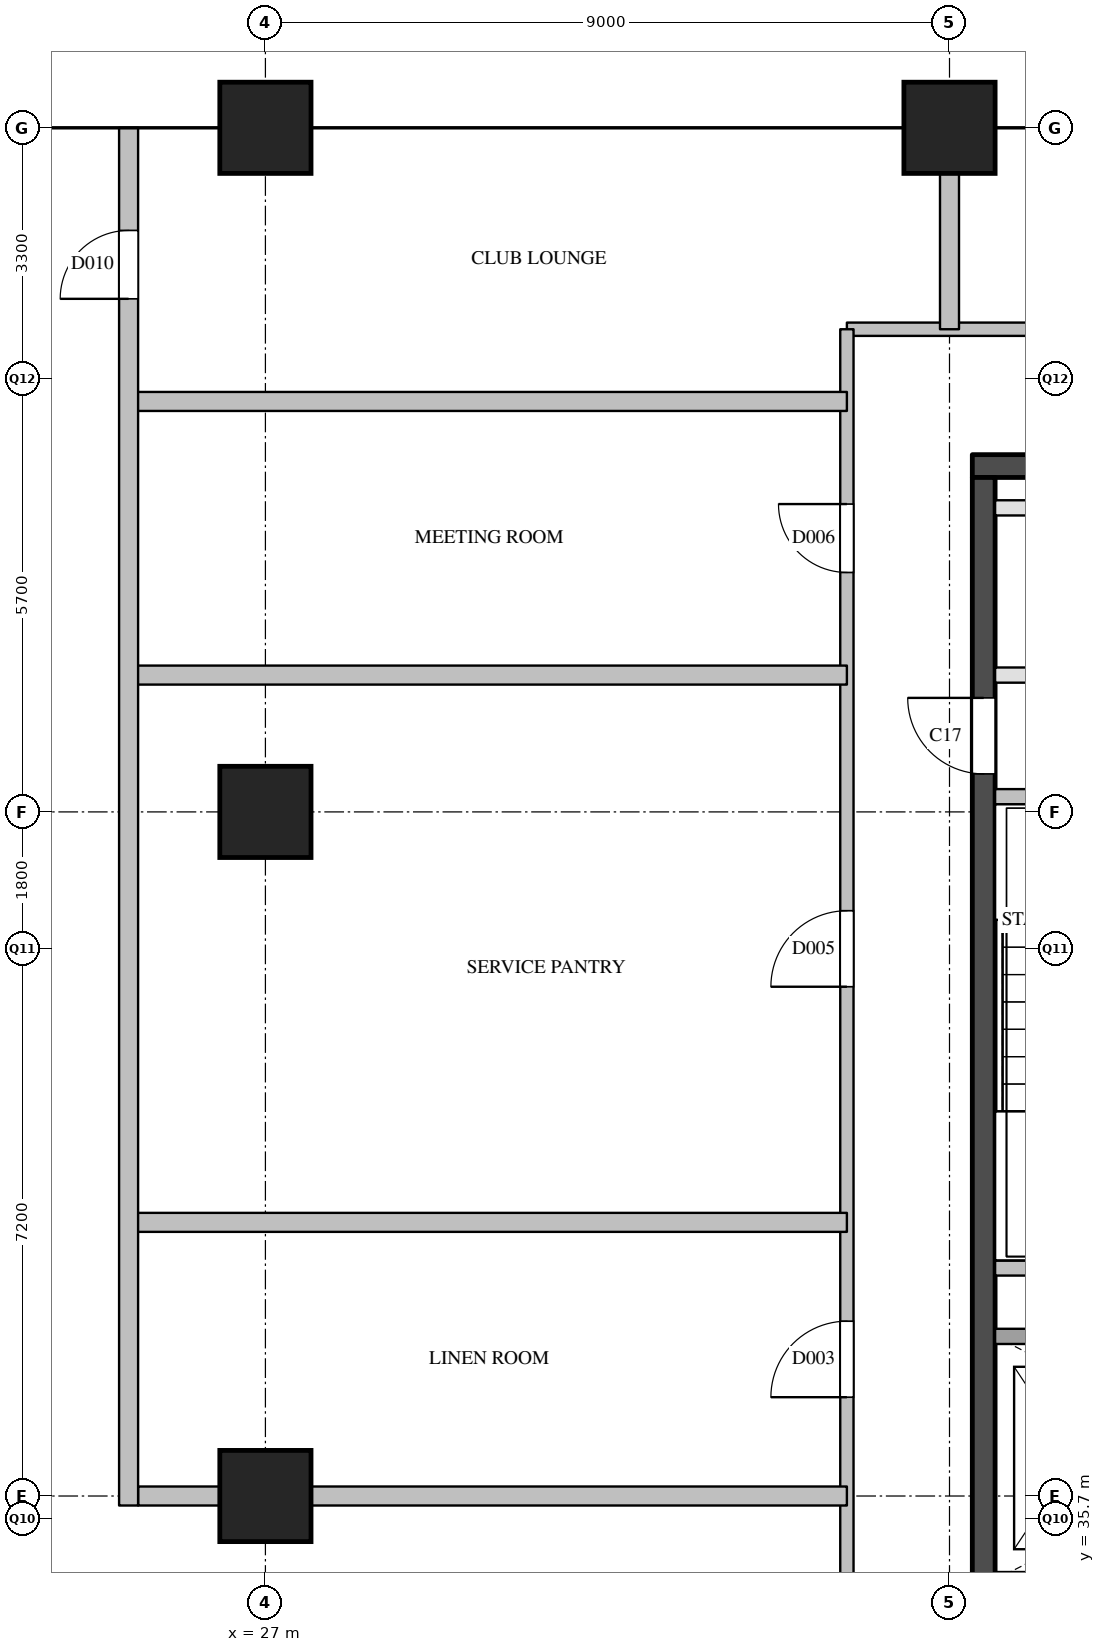
"""IFC4 building model, lengths in metres.
Left out: names, types, materials, properties, quantities, classifications, styles, units other than length and angle.
Written with IfcOpenShell. Run it as: python <this file> out.ifc"""

import sys

from ifc_helpers import new_model, si_unit, direction, frame, frame_2d, origin, origin_2d, place, context, subcontext, project, spatial, rectangle, extrude, element, fill, save


model = new_model("IFC4")
c1 = context("Model", 3, precision=1e-05, world=origin(), true_north=direction((0.0, 1.0)))
c2 = subcontext(c1, "Body", "Model", "MODEL_VIEW")
j1 = project(units=[si_unit("LENGTHUNIT", "METRE"), si_unit("PLANEANGLEUNIT", "RADIAN")], contexts=[c1])
p1 = place(None, origin())
s1 = spatial("IfcSite", under=j1, at=p1, CompositionType="ELEMENT")
p2 = place(p1, origin())
s2 = spatial("IfcBuilding", under=s1, at=p2, CompositionType="ELEMENT")
p3 = place(p2, frame((0.0, 0.0, 290.2)))
s3 = spatial("IfcBuildingStorey", under=s2, at=p3, CompositionType="ELEMENT", Elevation=290.2)
for number, where, z_axis, x_axis in (
    (1, (27.0, 36.0, 0.0), (0.0, 0.0, 1.0), (1.0, 0.0, 0.0)),
    (2, (27.0, 45.0, 0.0), (0.0, 0.0, 1.0), (1.0, 0.0, 0.0)),
    (3, (27.0, 54.0, 0.0), (0.0, 0.0, 1.0), (1.0, 0.0, 0.0)),
    (4, (36.0, 54.0, 0.0), (0.0, 0.0, 1.0), (1.0, 0.0, 0.0)),
):
    element("IfcColumn", number, at=place(p3, frame(where, z_axis=z_axis, x_axis=x_axis)), inside=s3, PredefinedType="COLUMN", context=c2, shape_type="SweptSolid", body=[
        extrude(rectangle(XDim=1.2, YDim=1.2, at=origin_2d()), origin(), (0.0, 0.0, 1.0), 5.0),
    ])
p4 = place(p3, frame((36.3, 49.55, 0.0), z_axis=(0.0, 0.0, 1.0), x_axis=(1.0, 0.0, 0.0)))
e5 = element("IfcWall", 5, at=p4, inside=s3, PredefinedType="SHEAR", context=c2, shape_type="SweptSolid", body=[
    extrude(rectangle(XDim=11.8, YDim=0.3, at=frame_2d((5.9, 0.0))), origin(), (0.0, 0.0, 1.0), 4.5),
])
p5 = place(p3, frame((36.45, 29.1, 0.0), z_axis=(0.0, 0.0, 1.0), x_axis=(0.0, 1.0, 0.0)))
e6 = element("IfcWall", 6, at=p5, inside=s3, PredefinedType="SHEAR", context=c2, shape_type="SweptSolid", body=[
    extrude(rectangle(XDim=20.3, YDim=0.3, at=frame_2d((10.15, 0.0))), origin(), (0.0, 0.0, 1.0), 4.5),
])
p6 = place(p5, frame((3.6, 0.0, 0.0)))
e7 = element("IfcOpeningElement", 7, at=p6, cuts=e6, PredefinedType="OPENING", context=c2, shape_type="SweptSolid", body=[
    extrude(rectangle(XDim=1.8, YDim=2.1, at=frame_2d((0.9, 1.05))), frame((0.0, 0.16, 0.0), z_axis=(0.0, -1.0, 0.0), x_axis=(1.0, 0.0, 0.0)), (0.0, 0.0, 1.0), 0.32),
])
p7 = place(p5, frame((16.4, 0.0, 0.0)))
e8 = element("IfcOpeningElement", 8, at=p7, cuts=e6, PredefinedType="OPENING", context=c2, shape_type="SweptSolid", body=[
    extrude(rectangle(XDim=1.0, YDim=2.1, at=frame_2d((0.5, 1.05))), frame((0.0, 0.16, 0.0), z_axis=(0.0, -1.0, 0.0), x_axis=(1.0, 0.0, 0.0)), (0.0, 0.0, 1.0), 0.32),
])
p8 = place(p3, frame((36.6, 38.1, 0.0), z_axis=(0.0, 0.0, 1.0), x_axis=(1.0, 0.0, 0.0)))
e9 = element("IfcWall", 9, at=p8, inside=s3, PredefinedType="SOLIDWALL", context=c2, shape_type="SweptSolid", body=[
    extrude(rectangle(XDim=6.7, YDim=0.2, at=frame_2d((3.35, 0.0))), origin(), (0.0, 0.0, 1.0), 4.5),
])
p9 = place(p8, frame((0.45, 0.0, 0.0)))
e10 = element("IfcOpeningElement", 10, at=p9, cuts=e9, PredefinedType="OPENING", context=c2, shape_type="SweptSolid", body=[
    extrude(rectangle(XDim=1.2, YDim=2.1, at=frame_2d((0.6, 1.05))), frame((0.0, 0.11, 0.0), z_axis=(0.0, -1.0, 0.0), x_axis=(1.0, 0.0, 0.0)), (0.0, 0.0, 1.0), 0.22),
])
p10 = place(p8, frame((2.55, 0.0, 0.0)))
e11 = element("IfcOpeningElement", 11, at=p10, cuts=e9, PredefinedType="OPENING", context=c2, shape_type="SweptSolid", body=[
    extrude(rectangle(XDim=1.2, YDim=2.1, at=frame_2d((0.6, 1.05))), frame((0.0, 0.11, 0.0), z_axis=(0.0, -1.0, 0.0), x_axis=(1.0, 0.0, 0.0)), (0.0, 0.0, 1.0), 0.22),
])
p11 = place(p8, frame((4.65, 0.0, 0.0)))
e12 = element("IfcOpeningElement", 12, at=p11, cuts=e9, PredefinedType="OPENING", context=c2, shape_type="SweptSolid", body=[
    extrude(rectangle(XDim=1.2, YDim=2.1, at=frame_2d((0.6, 1.05))), frame((0.0, 0.11, 0.0), z_axis=(0.0, -1.0, 0.0), x_axis=(1.0, 0.0, 0.0)), (0.0, 0.0, 1.0), 0.22),
])
p12 = place(p3, frame((36.6, 39.0, 0.0), z_axis=(0.0, 0.0, 1.0), x_axis=(1.0, 0.0, 0.0)))
e13 = element("IfcWall", 13, at=p12, inside=s3, PredefinedType="SOLIDWALL", context=c2, shape_type="SweptSolid", body=[
    extrude(rectangle(XDim=3.25, YDim=0.2, at=frame_2d((1.625, 0.0))), origin(), (0.0, 0.0, 1.0), 4.5),
])
p13 = place(p3, frame((36.6, 45.2, 0.0), z_axis=(0.0, 0.0, 1.0), x_axis=(1.0, 0.0, 0.0)))
e14 = element("IfcWall", 14, at=p13, inside=s3, PredefinedType="SOLIDWALL", context=c2, shape_type="SweptSolid", body=[
    extrude(rectangle(XDim=3.25, YDim=0.2, at=frame_2d((1.625, 0.0))), origin(), (0.0, 0.0, 1.0), 4.5),
])
p14 = place(p13, frame((1.125, 0.0, 0.0)))
e15 = element("IfcOpeningElement", 15, at=p14, cuts=e14, PredefinedType="OPENING", context=c2, shape_type="SweptSolid", body=[
    extrude(rectangle(XDim=1.1, YDim=2.1, at=frame_2d((0.55, 1.05))), frame((0.0, 0.11, 0.0), z_axis=(0.0, -1.0, 0.0), x_axis=(1.0, 0.0, 0.0)), (0.0, 0.0, 1.0), 0.22),
])
p15 = place(p3, frame((36.6, 46.8, 0.0), z_axis=(0.0, 0.0, 1.0), x_axis=(1.0, 0.0, 0.0)))
e16 = element("IfcWall", 16, at=p15, inside=s3, PredefinedType="PARTITIONING", context=c2, shape_type="SweptSolid", body=[
    extrude(rectangle(XDim=11.2, YDim=0.2, at=frame_2d((5.6, 0.0))), origin(), (0.0, 0.0, 1.0), 4.5),
])
p16 = place(p15, frame((3.75, 0.0, 0.0)))
e17 = element("IfcOpeningElement", 17, at=p16, cuts=e16, PredefinedType="OPENING", context=c2, shape_type="SweptSolid", body=[
    extrude(rectangle(XDim=0.9, YDim=2.1, at=frame_2d((0.45, 1.05))), frame((0.0, 0.11, 0.0), z_axis=(0.0, -1.0, 0.0), x_axis=(1.0, 0.0, 0.0)), (0.0, 0.0, 1.0), 0.22),
])
p17 = place(p15, frame((9.35, 0.0, 0.0)))
e18 = element("IfcOpeningElement", 18, at=p17, cuts=e16, PredefinedType="OPENING", context=c2, shape_type="SweptSolid", body=[
    extrude(rectangle(XDim=0.9, YDim=2.1, at=frame_2d((0.45, 1.05))), frame((0.0, 0.11, 0.0), z_axis=(0.0, -1.0, 0.0), x_axis=(1.0, 0.0, 0.0)), (0.0, 0.0, 1.0), 0.22),
])
p18 = place(p3, frame((36.6, 49.0, 0.0), z_axis=(0.0, 0.0, 1.0), x_axis=(1.0, 0.0, 0.0)))
e19 = element("IfcWall", 19, at=p18, inside=s3, PredefinedType="PARTITIONING", context=c2, shape_type="SweptSolid", body=[
    extrude(rectangle(XDim=11.2, YDim=0.2, at=frame_2d((5.6, 0.0))), origin(), (0.0, 0.0, 1.0), 4.5),
])
p19 = place(p3, frame((34.65, 51.35, 0.0), z_axis=(0.0, 0.0, 1.0), x_axis=(1.0, 0.0, 0.0)))
e20 = element("IfcWall", 20, at=p19, inside=s3, PredefinedType="PARTITIONING", context=c2, shape_type="SweptSolid", body=[
    extrude(rectangle(XDim=15.1, YDim=0.175, at=frame_2d((7.55, 0.0))), origin(), (0.0, 0.0, 1.0), 4.5),
])
p20 = place(p19, frame((4.45, 0.0, 0.0)))
e21 = element("IfcOpeningElement", 21, at=p20, cuts=e20, PredefinedType="OPENING", context=c2, shape_type="SweptSolid", body=[
    extrude(rectangle(XDim=1.0, YDim=2.1, at=frame_2d((0.5, 1.05))), frame((0.0, 0.097, 0.0), z_axis=(0.0, -1.0, 0.0), x_axis=(1.0, 0.0, 0.0)), (0.0, 0.0, 1.0), 0.195),
])
p21 = place(p19, frame((11.294, 0.0, 0.0)))
e22 = element("IfcOpeningElement", 22, at=p21, cuts=e20, PredefinedType="OPENING", context=c2, shape_type="SweptSolid", body=[
    extrude(rectangle(XDim=0.9, YDim=2.1, at=frame_2d((0.45, 1.05))), frame((0.0, 0.097, 0.0), z_axis=(0.0, -1.0, 0.0), x_axis=(1.0, 0.0, 0.0)), (0.0, 0.0, 1.0), 0.195),
])
p22 = place(p3, frame((34.65, 28.5, 0.0), z_axis=(0.0, 0.0, 1.0), x_axis=(0.0, 1.0, 0.0)))
e23 = element("IfcWall", 23, at=p22, inside=s3, PredefinedType="PARTITIONING", context=c2, shape_type="SweptSolid", body=[
    extrude(rectangle(XDim=22.85, YDim=0.175, at=frame_2d((11.425, 0.0))), origin(), (0.0, 0.0, 1.0), 4.5),
])
p23 = place(p22, frame((3.3, 0.0, 0.0)))
e24 = element("IfcOpeningElement", 24, at=p23, cuts=e23, PredefinedType="OPENING", context=c2, shape_type="SweptSolid", body=[
    extrude(rectangle(XDim=0.9, YDim=2.1, at=frame_2d((0.45, 1.05))), frame((0.0, 0.097, 0.0), z_axis=(0.0, -1.0, 0.0), x_axis=(1.0, 0.0, 0.0)), (0.0, 0.0, 1.0), 0.195),
])
p24 = place(p22, frame((8.8, 0.0, 0.0)))
e25 = element("IfcOpeningElement", 25, at=p24, cuts=e23, PredefinedType="OPENING", context=c2, shape_type="SweptSolid", body=[
    extrude(rectangle(XDim=1.0, YDim=2.1, at=frame_2d((0.5, 1.05))), frame((0.0, 0.097, 0.0), z_axis=(0.0, -1.0, 0.0), x_axis=(1.0, 0.0, 0.0)), (0.0, 0.0, 1.0), 0.195),
])
p25 = place(p22, frame((14.2, 0.0, 0.0)))
e26 = element("IfcOpeningElement", 26, at=p25, cuts=e23, PredefinedType="OPENING", context=c2, shape_type="SweptSolid", body=[
    extrude(rectangle(XDim=1.0, YDim=2.1, at=frame_2d((0.5, 1.05))), frame((0.0, 0.097, 0.0), z_axis=(0.0, -1.0, 0.0), x_axis=(1.0, 0.0, 0.0)), (0.0, 0.0, 1.0), 0.195),
])
p26 = place(p22, frame((19.65, 0.0, 0.0)))
e27 = element("IfcOpeningElement", 27, at=p26, cuts=e23, PredefinedType="OPENING", context=c2, shape_type="SweptSolid", body=[
    extrude(rectangle(XDim=0.9, YDim=2.1, at=frame_2d((0.45, 1.05))), frame((0.0, 0.097, 0.0), z_axis=(0.0, -1.0, 0.0), x_axis=(1.0, 0.0, 0.0)), (0.0, 0.0, 1.0), 0.195),
])
p27 = place(p3, frame((25.325, 36.0, 0.0), z_axis=(0.0, 0.0, 1.0), x_axis=(1.0, 0.0, 0.0)))
e28 = element("IfcWall", 28, at=p27, inside=s3, PredefinedType="PARTITIONING", context=c2, shape_type="SweptSolid", body=[
    extrude(rectangle(XDim=9.325, YDim=0.25, at=frame_2d((4.663, 0.0))), origin(), (0.0, 0.0, 1.0), 4.5),
])
for number, where, z_axis, x_axis in (
    (29, (25.2, 39.6, 0.0), (0.0, 0.0, 1.0), (1.0, 0.0, 0.0)),
    (30, (25.2, 46.8, 0.0), (0.0, 0.0, 1.0), (1.0, 0.0, 0.0)),
    (31, (25.2, 50.4, 0.0), (0.0, 0.0, 1.0), (1.0, 0.0, 0.0)),
):
    element("IfcWall", number, at=place(p3, frame(where, z_axis=z_axis, x_axis=x_axis)), inside=s3, PredefinedType="PARTITIONING", context=c2, shape_type="SweptSolid", body=[
        extrude(rectangle(XDim=9.45, YDim=0.25, at=frame_2d((4.725, 0.0))), origin(), (0.0, 0.0, 1.0), 3.5),
    ])
p28 = place(p3, frame((25.2, 35.875, 0.0), z_axis=(0.0, 0.0, 1.0), x_axis=(0.0, 1.0, 0.0)))
e32 = element("IfcWall", 32, at=p28, inside=s3, PredefinedType="PARTITIONING", context=c2, shape_type="SweptSolid", body=[
    extrude(rectangle(XDim=18.125, YDim=0.25, at=frame_2d((9.062, 0.0))), origin(), (0.0, 0.0, 1.0), 3.5),
])
p29 = place(p28, frame((15.875, 0.0, 0.0)))
e33 = element("IfcOpeningElement", 33, at=p29, cuts=e32, PredefinedType="OPENING", context=c2, shape_type="SweptSolid", body=[
    extrude(rectangle(XDim=0.9, YDim=2.1, at=frame_2d((0.45, 1.05))), frame((0.0, 0.135, 0.0), z_axis=(0.0, -1.0, 0.0), x_axis=(1.0, 0.0, 0.0)), (0.0, 0.0, 1.0), 0.27),
])
p30 = place(p3, frame((36.0, 51.35, 0.0), z_axis=(0.0, 0.0, 1.0), x_axis=(0.0, 1.0, 0.0)))
e34 = element("IfcWall", 34, at=p30, inside=s3, PredefinedType="PARTITIONING", context=c2, shape_type="SweptSolid", body=[
    extrude(rectangle(XDim=2.65, YDim=0.25, at=frame_2d((1.325, 0.0))), origin(), (0.0, 0.0, 1.0), 4.5),
])
p31 = place(p7, origin())
e35 = element("IfcDoor", 35, at=p31, inside=s3, OperationType="SINGLE_SWING_RIGHT", PredefinedType="DOOR", context=c2, shape_type="SweptSolid", body=[
    extrude(rectangle(XDim=1.0, YDim=2.1, at=frame_2d((0.5, 1.05))), frame((0.0, 0.025, 0.0), z_axis=(0.0, -1.0, 0.0), x_axis=(1.0, 0.0, 0.0)), (0.0, 0.0, 1.0), 0.05),
])
fill(e8, e35)
p32 = place(p24, origin())
e36 = element("IfcDoor", 36, at=p32, inside=s3, OperationType="SINGLE_SWING_LEFT", PredefinedType="DOOR", context=c2, shape_type="SweptSolid", body=[
    extrude(rectangle(XDim=1.0, YDim=2.1, at=frame_2d((0.5, 1.05))), frame((0.0, 0.025, 0.0), z_axis=(0.0, -1.0, 0.0), x_axis=(1.0, 0.0, 0.0)), (0.0, 0.0, 1.0), 0.05),
])
fill(e25, e36)
p33 = place(p25, origin())
e37 = element("IfcDoor", 37, at=p33, inside=s3, OperationType="SINGLE_SWING_LEFT", PredefinedType="DOOR", context=c2, shape_type="SweptSolid", body=[
    extrude(rectangle(XDim=1.0, YDim=2.1, at=frame_2d((0.5, 1.05))), frame((0.0, 0.025, 0.0), z_axis=(0.0, -1.0, 0.0), x_axis=(1.0, 0.0, 0.0)), (0.0, 0.0, 1.0), 0.05),
])
fill(e26, e37)
p34 = place(p26, origin())
e38 = element("IfcDoor", 38, at=p34, inside=s3, OperationType="SINGLE_SWING_RIGHT", PredefinedType="DOOR", context=c2, shape_type="SweptSolid", body=[
    extrude(rectangle(XDim=0.9, YDim=2.1, at=frame_2d((0.45, 1.05))), frame((0.0, 0.025, 0.0), z_axis=(0.0, -1.0, 0.0), x_axis=(1.0, 0.0, 0.0)), (0.0, 0.0, 1.0), 0.05),
])
fill(e27, e38)
p35 = place(p29, origin())
e39 = element("IfcDoor", 39, at=p35, inside=s3, OperationType="SINGLE_SWING_LEFT", PredefinedType="DOOR", context=c2, shape_type="SweptSolid", body=[
    extrude(rectangle(XDim=0.9, YDim=2.1, at=frame_2d((0.45, 1.05))), frame((0.0, 0.025, 0.0), z_axis=(0.0, -1.0, 0.0), x_axis=(1.0, 0.0, 0.0)), (0.0, 0.0, 1.0), 0.05),
])
fill(e33, e39)
save(model, sys.argv[1])
